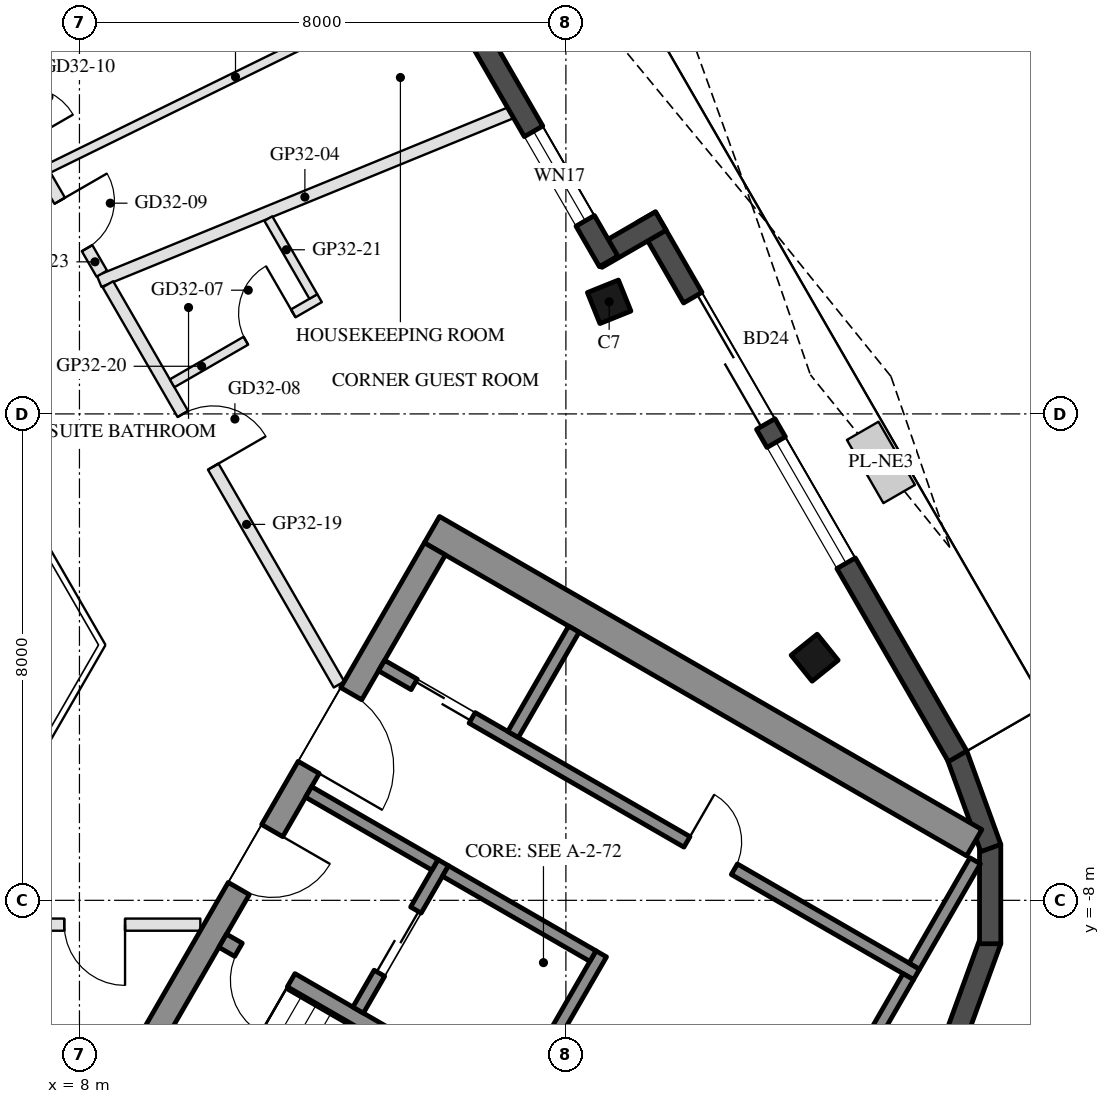
"""IFC4 building model, lengths in metres.
Left out: names, types, materials, properties, quantities, classifications, styles, units other than length and angle.
Written with IfcOpenShell. Run it as: python <this file> out.ifc"""

import sys

from ifc_helpers import new_model, si_unit, direction, frame, frame_2d, origin, origin_2d, place, context, subcontext, project, spatial, rectangle, hollow_rectangle, extrude, boolean, halfspace, element, fill, save


model = new_model("IFC4")
c1 = context("Model", 3, precision=1e-05, world=origin(), true_north=direction((0.0, 1.0)))
c2 = subcontext(c1, "Body", "Model", "MODEL_VIEW")
j1 = project(units=[si_unit("LENGTHUNIT", "METRE"), si_unit("PLANEANGLEUNIT", "RADIAN")], contexts=[c1])
p1 = place(None, origin())
s1 = spatial("IfcSite", under=j1, at=p1, CompositionType="ELEMENT")
p2 = place(p1, origin())
s2 = spatial("IfcBuilding", under=s1, at=p2, CompositionType="ELEMENT")
p3 = place(p2, frame((0.0, 0.0, 309.6)))
s3 = spatial("IfcBuildingStorey", under=s2, at=p3, CompositionType="ELEMENT", Elevation=309.6)
p4 = place(p3, frame((20.091, -4.01, 0.0), z_axis=(-0.190797858838, 0.029652330963, 0.981181388088), x_axis=(0.488342494533, -0.86421146304, 0.121079127777)))
e1 = element("IfcColumn", 1, at=p4, inside=s3, PredefinedType="COLUMN", context=c2, shape_type="SweptSolid", body=[
    boolean("DIFFERENCE", boolean("DIFFERENCE", extrude(hollow_rectangle(XDim=0.55, YDim=0.55, WallThickness=0.025, at=origin_2d()), origin(), (0.0, 0.0, 1.0), 3.771), halfspace(frame((0.0, 0.0, 0.04), z_axis=(0.0, 0.0, 1.0), x_axis=(1.0, 0.0, 0.0)), True)), halfspace(frame((0.0, 0.0, 3.731), z_axis=(0.0, 0.0, 1.0), x_axis=(1.0, 0.0, 0.0)), False)),
])
p5 = place(p3, frame((16.711, 1.844, 0.0), z_axis=(-0.161388519526, -0.022915997932, 0.986624854139), x_axis=(0.495109873729, -0.866696335889, 0.060857820306)))
e2 = element("IfcColumn", 2, at=p5, inside=s3, PredefinedType="COLUMN", context=c2, shape_type="SweptSolid", body=[
    boolean("DIFFERENCE", boolean("DIFFERENCE", extrude(hollow_rectangle(XDim=0.55, YDim=0.55, WallThickness=0.025, at=origin_2d()), origin(), (0.0, 0.0, 1.0), 3.75), halfspace(frame((0.0, 0.0, 0.034), z_axis=(0.0, 0.0, 1.0), x_axis=(1.0, 0.0, 0.0)), True)), halfspace(frame((0.0, 0.0, 3.716), z_axis=(0.0, 0.0, 1.0), x_axis=(1.0, 0.0, 0.0)), False)),
])
p6 = place(p3, frame((20.214, -11.671, 0.0), z_axis=(-0.190346159062, 0.109881938965, 0.975548204457), x_axis=(-0.499906392682, -0.866079441173, 1.1507946e-05)))
e3 = element("IfcColumn", 3, at=p6, inside=s3, PredefinedType="COLUMN", context=c2, shape_type="SweptSolid", body=[
    boolean("DIFFERENCE", boolean("DIFFERENCE", extrude(hollow_rectangle(XDim=2.0, YDim=2.0, WallThickness=0.05, at=origin_2d()), origin(), (0.0, 0.0, 1.0), 3.793), halfspace(frame((0.0, 0.0, 0.113), z_axis=(0.0, 0.0, 1.0), x_axis=(1.0, 0.0, 0.0)), True)), halfspace(frame((0.0, 0.0, 3.679), z_axis=(0.0, 0.0, 1.0), x_axis=(1.0, 0.0, 0.0)), False)),
])
for number, where, z_axis, x_axis in (
    (4, (22.429, -10.19, 0.0), (0.0, 0.0, 1.0), (0.342, 0.94, 0.0)),
    (5, (22.977, -8.714, 0.0), (0.0, 0.0, 1.0), (0.0, 1.0, 0.0)),
    (6, (22.988, -7.14, 0.0), (0.0, 0.0, 1.0), (-0.342, 0.94, 0.0)),
):
    element("IfcWall", number, at=place(p3, frame(where, z_axis=z_axis, x_axis=x_axis)), inside=s3, PredefinedType="SOLIDWALL", context=c2, shape_type="SweptSolid", body=[
        extrude(rectangle(XDim=1.634, YDim=0.35, at=frame_2d((0.817, 0.0))), origin(), (0.0, 0.0, 1.0), 3.55),
    ])
p7 = place(p3, frame((22.442, -5.632, 0.0), z_axis=(0.0, 0.0, 1.0), x_axis=(-0.499983205548, 0.866035099848, 0.0)))
e7 = element("IfcWall", 7, at=p7, inside=s3, PredefinedType="SOLIDWALL", context=c2, shape_type="SweptSolid", body=[
    extrude(rectangle(XDim=10.239, YDim=0.35, at=frame_2d((5.12, 0.0))), origin(), (0.0, 0.0, 1.0), 3.55),
])
p8 = place(p7, frame((6.311, 0.0, 0.0)))
e8 = element("IfcOpeningElement", 8, at=p8, cuts=e7, PredefinedType="OPENING", context=c2, shape_type="SweptSolid", body=[
    extrude(rectangle(XDim=2.4, YDim=2.4, at=frame_2d((1.2, 1.2))), frame((0.0, 0.185, 0.0), z_axis=(0.0, -1.0, 0.0), x_axis=(1.0, 0.0, 0.0)), (0.0, 0.0, 1.0), 0.37),
])
p9 = place(p7, frame((3.667, 0.0, 0.3)))
e9 = element("IfcOpeningElement", 9, at=p9, cuts=e7, PredefinedType="OPENING", context=c2, shape_type="SweptSolid", body=[
    extrude(rectangle(XDim=2.3, YDim=2.65, at=frame_2d((1.15, 1.325))), frame((0.0, 0.185, 0.0), z_axis=(0.0, -1.0, 0.0), x_axis=(1.0, 0.0, 0.0)), (0.0, 0.0, 1.0), 0.37),
])
p10 = place(p3, frame((17.562, 3.172, 0.0), z_axis=(0.0, 0.0, 1.0), x_axis=(-0.866005645448, -0.500034220881, 0.0)))
e10 = element("IfcWall", 10, at=p10, inside=s3, PredefinedType="SOLIDWALL", context=c2, shape_type="SweptSolid", body=[
    extrude(rectangle(XDim=1.22, YDim=0.35, at=frame_2d((0.61, 0.0))), origin(), (0.0, 0.0, 1.0), 3.55),
])
p11 = place(p3, frame((16.703, 2.509, 0.0), z_axis=(0.0, 0.0, 1.0), x_axis=(-0.499975351079, 0.866039634378, 0.0)))
e11 = element("IfcWall", 11, at=p11, inside=s3, PredefinedType="SOLIDWALL", context=c2, shape_type="SweptSolid", body=[
    extrude(rectangle(XDim=5.599, YDim=0.35, at=frame_2d((2.799, 0.0))), origin(), (0.0, 0.0, 1.0), 3.55),
])
p12 = place(p11, frame((0.77, 0.0, 0.3)))
e12 = element("IfcOpeningElement", 12, at=p12, cuts=e11, PredefinedType="OPENING", context=c2, shape_type="SweptSolid", body=[
    extrude(rectangle(XDim=1.7, YDim=2.65, at=frame_2d((0.85, 1.325))), frame((0.0, 0.185, 0.0), z_axis=(0.0, -1.0, 0.0), x_axis=(1.0, 0.0, 0.0)), (0.0, 0.0, 1.0), 0.37),
])
p13 = place(p3, frame((13.797, -1.903, 0.0), z_axis=(0.0, 0.0, 1.0), x_axis=(0.866027279078, -0.499996751883, 0.0)))
e13 = element("IfcWall", 13, at=p13, inside=s3, PredefinedType="SHEAR", context=c2, shape_type="SweptSolid", body=[
    extrude(rectangle(XDim=10.298, YDim=0.5, at=frame_2d((5.149, 0.0))), origin(), (0.0, 0.0, 1.0), 3.5),
])
p14 = place(p3, frame((8.845, -10.88, 0.0), z_axis=(0.0, 0.0, 1.0), x_axis=(0.500004234368, 0.866022959057, 0.0)))
e14 = element("IfcWall", 14, at=p14, inside=s3, PredefinedType="SHEAR", context=c2, shape_type="SweptSolid", body=[
    extrude(rectangle(XDim=10.0, YDim=0.4, at=frame_2d((5.0, 0.0))), origin(), (0.0, 0.0, 1.0), 3.5),
])
p15 = place(p14, frame((3.55, 0.0, 0.0)))
e15 = element("IfcOpeningElement", 15, at=p15, cuts=e14, PredefinedType="OPENING", context=c2, shape_type="SweptSolid", body=[
    extrude(rectangle(XDim=1.1, YDim=2.1, at=frame_2d((0.55, 1.05))), frame((0.0, 0.21, 0.0), z_axis=(0.0, -1.0, 0.0), x_axis=(1.0, 0.0, 0.0)), (0.0, 0.0, 1.0), 0.42),
])
p16 = place(p14, frame((5.85, 0.0, 0.0)))
e16 = element("IfcOpeningElement", 16, at=p16, cuts=e14, PredefinedType="OPENING", context=c2, shape_type="SweptSolid", body=[
    extrude(rectangle(XDim=1.4, YDim=2.1, at=frame_2d((0.7, 1.05))), frame((0.0, 0.21, 0.0), z_axis=(0.0, -1.0, 0.0), x_axis=(1.0, 0.0, 0.0)), (0.0, 0.0, 1.0), 0.42),
])
p17 = place(p3, frame((10.356, -8.664, 0.0), z_axis=(0.0, 0.0, 1.0), x_axis=(0.866028629588, -0.499994412703, 0.0)))
e17 = element("IfcWall", 17, at=p17, inside=s3, PredefinedType="SHEAR", context=c2, shape_type="SweptSolid", body=[
    extrude(rectangle(XDim=6.45, YDim=0.25, at=frame_2d((3.225, 0.0))), origin(), (0.0, 0.0, 1.0), 3.5),
])
p18 = place(p17, frame((0.3, 0.0, 0.0)))
e18 = element("IfcOpeningElement", 18, at=p18, cuts=e17, PredefinedType="OPENING", context=c2, shape_type="SweptSolid", body=[
    extrude(rectangle(XDim=1.0, YDim=2.1, at=frame_2d((0.5, 1.05))), frame((0.0, 0.135, 0.0), z_axis=(0.0, -1.0, 0.0), x_axis=(1.0, 0.0, 0.0)), (0.0, 0.0, 1.0), 0.27),
])
p19 = place(p3, frame((15.181, -11.305, 0.0), z_axis=(0.0, 0.0, 1.0), x_axis=(0.49994636267, 0.866056369097, 0.0)))
e19 = element("IfcWall", 19, at=p19, inside=s3, PredefinedType="SHEAR", context=c2, shape_type="SweptSolid", body=[
    extrude(rectangle(XDim=2.8, YDim=0.2, at=frame_2d((1.4, 0.0))), origin(), (0.0, 0.0, 1.0), 3.5),
])
p20 = place(p3, frame((12.583, -9.805, 0.0), z_axis=(0.0, 0.0, 1.0), x_axis=(0.49994636267, 0.866056369097, 0.0)))
e20 = element("IfcWall", 20, at=p20, inside=s3, PredefinedType="SHEAR", context=c2, shape_type="SweptSolid", body=[
    extrude(rectangle(XDim=2.8, YDim=0.2, at=frame_2d((1.4, 0.0))), origin(), (0.0, 0.0, 1.0), 3.5),
])
p21 = place(p20, frame((0.7, 0.0, 0.0)))
e21 = element("IfcOpeningElement", 21, at=p21, cuts=e20, PredefinedType="OPENING", context=c2, shape_type="SweptSolid", body=[
    extrude(rectangle(XDim=1.2, YDim=2.1, at=frame_2d((0.6, 1.05))), frame((0.0, 0.11, 0.0), z_axis=(0.0, -1.0, 0.0), x_axis=(1.0, 0.0, 0.0)), (0.0, 0.0, 1.0), 0.22),
])
p22 = place(p3, frame((11.768, -6.217, 0.0), z_axis=(0.0, 0.0, 1.0), x_axis=(0.866050077142, -0.499957262057, 0.0)))
e22 = element("IfcWall", 22, at=p22, inside=s3, PredefinedType="SHEAR", context=c2, shape_type="SweptSolid", body=[
    extrude(rectangle(XDim=2.4, YDim=0.2, at=frame_2d((1.2, 0.0))), origin(), (0.0, 0.0, 1.0), 3.5),
])
p23 = place(p3, frame((14.02, -7.517, 0.0), z_axis=(0.0, 0.0, 1.0), x_axis=(0.866034573852, -0.49998411664, 0.0)))
e23 = element("IfcWall", 23, at=p23, inside=s3, PredefinedType="SHEAR", context=c2, shape_type="SweptSolid", body=[
    extrude(rectangle(XDim=2.8, YDim=0.2, at=frame_2d((1.4, 0.0))), origin(), (0.0, 0.0, 1.0), 3.5),
])
p24 = place(p3, frame((12.968, -4.138, 0.0), z_axis=(0.0, 0.0, 1.0), x_axis=(0.866028328073, -0.49999493495, 0.0)))
e24 = element("IfcWall", 24, at=p24, inside=s3, PredefinedType="SHEAR", context=c2, shape_type="SweptSolid", body=[
    extrude(rectangle(XDim=10.16, YDim=0.2, at=frame_2d((5.08, 0.0))), origin(), (0.0, 0.0, 1.0), 3.5),
])
p25 = place(p24, frame((0.62, 0.0, 0.0)))
e25 = element("IfcOpeningElement", 25, at=p25, cuts=e24, PredefinedType="OPENING", context=c2, shape_type="SweptSolid", body=[
    extrude(rectangle(XDim=1.1, YDim=2.1, at=frame_2d((0.55, 1.05))), frame((0.0, 0.11, 0.0), z_axis=(0.0, -1.0, 0.0), x_axis=(1.0, 0.0, 0.0)), (0.0, 0.0, 1.0), 0.22),
])
p26 = place(p24, frame((5.8, 0.0, 0.0)))
e26 = element("IfcOpeningElement", 26, at=p26, cuts=e24, PredefinedType="OPENING", context=c2, shape_type="SweptSolid", body=[
    extrude(rectangle(XDim=0.9, YDim=2.1, at=frame_2d((0.45, 1.05))), frame((0.0, 0.11, 0.0), z_axis=(0.0, -1.0, 0.0), x_axis=(1.0, 0.0, 0.0)), (0.0, 0.0, 1.0), 0.22),
])
p27 = place(p3, frame((20.73, -10.814, 0.0), z_axis=(0.0, 0.0, 1.0), x_axis=(0.499961193289, 0.866047807691, 0.0)))
e27 = element("IfcWall", 27, at=p27, inside=s3, PredefinedType="SHEAR", context=c2, shape_type="SweptSolid", body=[
    extrude(rectangle(XDim=1.8, YDim=0.2, at=frame_2d((0.9, 0.0))), origin(), (0.0, 0.0, 1.0), 3.5),
])
for number, where, z_axis, x_axis in (
    (28, (15.131, -5.272, 0.0), (0.0, 0.0, 1.0), (0.5, 0.866, 0.0)),
    (29, (21.73, -9.082, 0.0), (0.0, 0.0, 1.0), (0.5, 0.866, 0.0)),
):
    element("IfcWall", number, at=place(p3, frame(where, z_axis=z_axis, x_axis=x_axis)), inside=s3, PredefinedType="SHEAR", context=c2, shape_type="SweptSolid", body=[
        extrude(rectangle(XDim=2.0, YDim=0.2, at=frame_2d((1.0, 0.0))), origin(), (0.0, 0.0, 1.0), 3.5),
    ])
p28 = place(p3, frame((15.091, 4.951, 0.0), z_axis=(0.0, 0.0, 1.0), x_axis=(-0.925459695547, -0.378846079454, 0.0)))
e30 = element("IfcWall", 30, at=p28, inside=s3, PredefinedType="PARTITIONING", context=c2, shape_type="SweptSolid", body=[
    extrude(rectangle(XDim=7.311, YDim=0.2, at=frame_2d((3.656, 0.0))), origin(), (0.0, 0.0, 1.0), 3.1),
])
p29 = place(p3, frame((13.341, 9.781, 0.0), z_axis=(0.0, 0.0, 1.0), x_axis=(-0.866020851292, -0.500007885066, 0.0)))
e31 = element("IfcWall", 31, at=p29, inside=s3, PredefinedType="PARTITIONING", context=c2, shape_type="SweptSolid", body=[
    extrude(rectangle(XDim=8.144, YDim=0.2, at=frame_2d((4.072, 0.0))), origin(), (0.0, 0.0, 1.0), 3.1),
])
p30 = place(p3, frame((9.988, -8.4, 0.0), z_axis=(0.0, 0.0, 1.0), x_axis=(-1.0, 0.0, 0.0)))
e32 = element("IfcWall", 32, at=p30, inside=s3, PredefinedType="PARTITIONING", context=c2, shape_type="SweptSolid", body=[
    extrude(rectangle(XDim=4.688, YDim=0.2, at=frame_2d((2.344, 0.0))), origin(), (0.0, 0.0, 1.0), 3.1),
])
p31 = place(p30, frame((1.238, 0.0, 0.0)))
e33 = element("IfcOpeningElement", 33, at=p31, cuts=e32, PredefinedType="OPENING", context=c2, shape_type="SweptSolid", body=[
    extrude(rectangle(XDim=1.0, YDim=2.1, at=frame_2d((0.5, 1.05))), frame((0.0, 0.11, 0.0), z_axis=(0.0, -1.0, 0.0), x_axis=(1.0, 0.0, 0.0)), (0.0, 0.0, 1.0), 0.22),
])
p32 = place(p3, frame((8.468, 2.133, 0.0), z_axis=(0.0, 0.0, 1.0), x_axis=(0.50001161234, -0.866018699293, 0.0)))
e34 = element("IfcWall", 34, at=p32, inside=s3, PredefinedType="PARTITIONING", context=c2, shape_type="SweptSolid", body=[
    extrude(rectangle(XDim=7.601, YDim=0.2, at=frame_2d((3.8, 0.0))), origin(), (0.0, 0.0, 1.0), 3.1),
])
p33 = place(p32, frame((2.464, 0.0, 0.0)))
e35 = element("IfcOpeningElement", 35, at=p33, cuts=e34, PredefinedType="OPENING", context=c2, shape_type="SweptSolid", body=[
    extrude(rectangle(XDim=1.0, YDim=2.1, at=frame_2d((0.5, 1.05))), frame((0.0, 0.11, 0.0), z_axis=(0.0, -1.0, 0.0), x_axis=(1.0, 0.0, 0.0)), (0.0, 0.0, 1.0), 0.22),
])
p34 = place(p3, frame((9.524, 0.504, 0.0), z_axis=(0.0, 0.0, 1.0), x_axis=(0.866034573852, 0.49998411664, 0.0)))
e36 = element("IfcWall", 36, at=p34, inside=s3, PredefinedType="PARTITIONING", context=c2, shape_type="SweptSolid", body=[
    extrude(rectangle(XDim=2.8, YDim=0.15, at=frame_2d((1.4, 0.0))), origin(), (0.0, 0.0, 1.0), 3.55),
])
p35 = place(p34, frame((1.4, 0.0, 0.0)))
e37 = element("IfcOpeningElement", 37, at=p35, cuts=e36, PredefinedType="OPENING", context=c2, shape_type="SweptSolid", body=[
    extrude(rectangle(XDim=0.9, YDim=2.1, at=frame_2d((0.45, 1.05))), frame((0.0, 0.085, 0.0), z_axis=(0.0, -1.0, 0.0), x_axis=(1.0, 0.0, 0.0)), (0.0, 0.0, 1.0), 0.17),
])
p36 = place(p3, frame((11.847, 1.931, 0.0), z_axis=(0.0, 0.0, 1.0), x_axis=(-0.50006043627, 0.865990508076, 0.0)))
e38 = element("IfcWall", 38, at=p36, inside=s3, PredefinedType="PARTITIONING", context=c2, shape_type="SweptSolid", body=[
    extrude(rectangle(XDim=1.48, YDim=0.15, at=frame_2d((0.74, 0.0))), origin(), (0.0, 0.0, 1.0), 3.1),
])
p37 = place(p3, frame((13.826, 7.141, 0.0), z_axis=(0.0, 0.0, 1.0), x_axis=(-0.897929581281, -0.440139145113, 0.0)))
e39 = element("IfcWall", 39, at=p37, inside=s3, PredefinedType="PARTITIONING", context=c2, shape_type="SweptSolid", body=[
    extrude(rectangle(XDim=7.261, YDim=0.15, at=frame_2d((3.631, 0.0))), origin(), (0.0, 0.0, 1.0), 3.1),
])
p38 = place(p3, frame((7.434, 3.924, 0.0), z_axis=(0.0, 0.0, 1.0), x_axis=(0.500118569225, -0.865956936987, 0.0)))
e40 = element("IfcWall", 40, at=p38, inside=s3, PredefinedType="PARTITIONING", context=c2, shape_type="SweptSolid", body=[
    extrude(rectangle(XDim=1.867, YDim=0.2, at=frame_2d((0.934, 0.0))), origin(), (0.0, 0.0, 1.0), 3.55),
])
p39 = place(p38, frame((0.484, 0.0, 0.0)))
e41 = element("IfcOpeningElement", 41, at=p39, cuts=e40, PredefinedType="OPENING", context=c2, shape_type="SweptSolid", body=[
    extrude(rectangle(XDim=0.9, YDim=2.1, at=frame_2d((0.45, 1.05))), frame((0.0, 0.11, 0.0), z_axis=(0.0, -1.0, 0.0), x_axis=(1.0, 0.0, 0.0)), (0.0, 0.0, 1.0), 0.22),
])
p40 = place(p8, frame((2.4, 0.0, 0.0), z_axis=(0.0, 0.0, 1.0), x_axis=(-1.0, 0.0, 0.0)))
e42 = element("IfcDoor", 42, at=p40, inside=s3, OperationType="SLIDING_TO_LEFT", PredefinedType="DOOR", context=c2, shape_type="SweptSolid", body=[
    extrude(rectangle(XDim=2.4, YDim=2.4, at=frame_2d((1.2, 1.2))), frame((0.0, 0.025, 0.0), z_axis=(0.0, -1.0, 0.0), x_axis=(1.0, 0.0, 0.0)), (0.0, 0.0, 1.0), 0.05),
])
fill(e8, e42)
p41 = place(p9, origin())
e43 = element("IfcWindow", 43, at=p41, inside=s3, PartitioningType="SINGLE_PANEL", PredefinedType="WINDOW", context=c2, shape_type="SweptSolid", body=[
    extrude(rectangle(XDim=2.3, YDim=2.65, at=frame_2d((1.15, 1.325))), frame((0.0, 0.03, 0.0), z_axis=(0.0, -1.0, 0.0), x_axis=(1.0, 0.0, 0.0)), (0.0, 0.0, 1.0), 0.06),
])
fill(e9, e43)
p42 = place(p12, origin())
e44 = element("IfcWindow", 44, at=p42, inside=s3, PartitioningType="SINGLE_PANEL", PredefinedType="WINDOW", context=c2, shape_type="SweptSolid", body=[
    extrude(rectangle(XDim=1.7, YDim=2.65, at=frame_2d((0.85, 1.325))), frame((0.0, 0.03, 0.0), z_axis=(0.0, -1.0, 0.0), x_axis=(1.0, 0.0, 0.0)), (0.0, 0.0, 1.0), 0.06),
])
fill(e12, e44)
p43 = place(p21, origin())
e45 = element("IfcDoor", 45, at=p43, inside=s3, OperationType="DOUBLE_DOOR_SLIDING", PredefinedType="DOOR", context=c2, shape_type="SweptSolid", body=[
    extrude(rectangle(XDim=1.2, YDim=2.1, at=frame_2d((0.6, 1.05))), frame((0.0, 0.025, 0.0), z_axis=(0.0, -1.0, 0.0), x_axis=(1.0, 0.0, 0.0)), (0.0, 0.0, 1.0), 0.05),
])
fill(e21, e45)
p44 = place(p25, origin())
e46 = element("IfcDoor", 46, at=p44, inside=s3, OperationType="DOUBLE_DOOR_SLIDING", PredefinedType="DOOR", context=c2, shape_type="SweptSolid", body=[
    extrude(rectangle(XDim=1.1, YDim=2.1, at=frame_2d((0.55, 1.05))), frame((0.0, 0.025, 0.0), z_axis=(0.0, -1.0, 0.0), x_axis=(1.0, 0.0, 0.0)), (0.0, 0.0, 1.0), 0.05),
])
fill(e25, e46)
p45 = place(p26, origin())
e47 = element("IfcDoor", 47, at=p45, inside=s3, OperationType="SINGLE_SWING_LEFT", PredefinedType="DOOR", context=c2, shape_type="SweptSolid", body=[
    extrude(rectangle(XDim=0.9, YDim=2.1, at=frame_2d((0.45, 1.05))), frame((0.0, 0.025, 0.0), z_axis=(0.0, -1.0, 0.0), x_axis=(1.0, 0.0, 0.0)), (0.0, 0.0, 1.0), 0.05),
])
fill(e26, e47)
p46 = place(p15, frame((1.1, 0.0, 0.0), z_axis=(0.0, 0.0, 1.0), x_axis=(-1.0, 0.0, 0.0)))
e48 = element("IfcDoor", 48, at=p46, inside=s3, OperationType="SINGLE_SWING_LEFT", PredefinedType="DOOR", context=c2, shape_type="SweptSolid", body=[
    extrude(rectangle(XDim=1.1, YDim=2.1, at=frame_2d((0.55, 1.05))), frame((0.0, 0.025, 0.0), z_axis=(0.0, -1.0, 0.0), x_axis=(1.0, 0.0, 0.0)), (0.0, 0.0, 1.0), 0.05),
])
fill(e15, e48)
p47 = place(p16, frame((1.4, 0.0, 0.0), z_axis=(0.0, 0.0, 1.0), x_axis=(-1.0, 0.0, 0.0)))
e49 = element("IfcDoor", 49, at=p47, inside=s3, OperationType="DOUBLE_DOOR_SINGLE_SWING", PredefinedType="DOOR", context=c2, shape_type="SweptSolid", body=[
    extrude(rectangle(XDim=1.4, YDim=2.1, at=frame_2d((0.7, 1.05))), frame((0.0, 0.025, 0.0), z_axis=(0.0, -1.0, 0.0), x_axis=(1.0, 0.0, 0.0)), (0.0, 0.0, 1.0), 0.05),
])
fill(e16, e49)
p48 = place(p18, frame((1.0, 0.0, 0.0), z_axis=(0.0, 0.0, 1.0), x_axis=(-1.0, 0.0, 0.0)))
e50 = element("IfcDoor", 50, at=p48, inside=s3, OperationType="SINGLE_SWING_LEFT", PredefinedType="DOOR", context=c2, shape_type="SweptSolid", body=[
    extrude(rectangle(XDim=1.0, YDim=2.1, at=frame_2d((0.5, 1.05))), frame((0.0, 0.025, 0.0), z_axis=(0.0, -1.0, 0.0), x_axis=(1.0, 0.0, 0.0)), (0.0, 0.0, 1.0), 0.05),
])
fill(e18, e50)
p49 = place(p31, origin())
e51 = element("IfcDoor", 51, at=p49, inside=s3, OperationType="SINGLE_SWING_LEFT", PredefinedType="DOOR", context=c2, shape_type="SweptSolid", body=[
    extrude(rectangle(XDim=1.0, YDim=2.1, at=frame_2d((0.5, 1.05))), frame((0.0, 0.025, 0.0), z_axis=(0.0, -1.0, 0.0), x_axis=(1.0, 0.0, 0.0)), (0.0, 0.0, 1.0), 0.05),
])
fill(e33, e51)
p50 = place(p35, origin())
e52 = element("IfcDoor", 52, at=p50, inside=s3, OperationType="SINGLE_SWING_RIGHT", PredefinedType="DOOR", context=c2, shape_type="SweptSolid", body=[
    extrude(rectangle(XDim=0.9, YDim=2.1, at=frame_2d((0.45, 1.05))), frame((0.0, 0.025, 0.0), z_axis=(0.0, -1.0, 0.0), x_axis=(1.0, 0.0, 0.0)), (0.0, 0.0, 1.0), 0.05),
])
fill(e37, e52)
p51 = place(p33, origin())
e53 = element("IfcDoor", 53, at=p51, inside=s3, OperationType="SINGLE_SWING_RIGHT", PredefinedType="DOOR", context=c2, shape_type="SweptSolid", body=[
    extrude(rectangle(XDim=1.0, YDim=2.1, at=frame_2d((0.5, 1.05))), frame((0.0, 0.025, 0.0), z_axis=(0.0, -1.0, 0.0), x_axis=(1.0, 0.0, 0.0)), (0.0, 0.0, 1.0), 0.05),
])
fill(e35, e53)
p52 = place(p39, origin())
e54 = element("IfcDoor", 54, at=p52, inside=s3, OperationType="SINGLE_SWING_LEFT", PredefinedType="DOOR", context=c2, shape_type="SweptSolid", body=[
    extrude(rectangle(XDim=0.9, YDim=2.1, at=frame_2d((0.45, 1.05))), frame((0.0, 0.025, 0.0), z_axis=(0.0, -1.0, 0.0), x_axis=(1.0, 0.0, 0.0)), (0.0, 0.0, 1.0), 0.05),
])
fill(e41, e54)
save(model, sys.argv[1])
